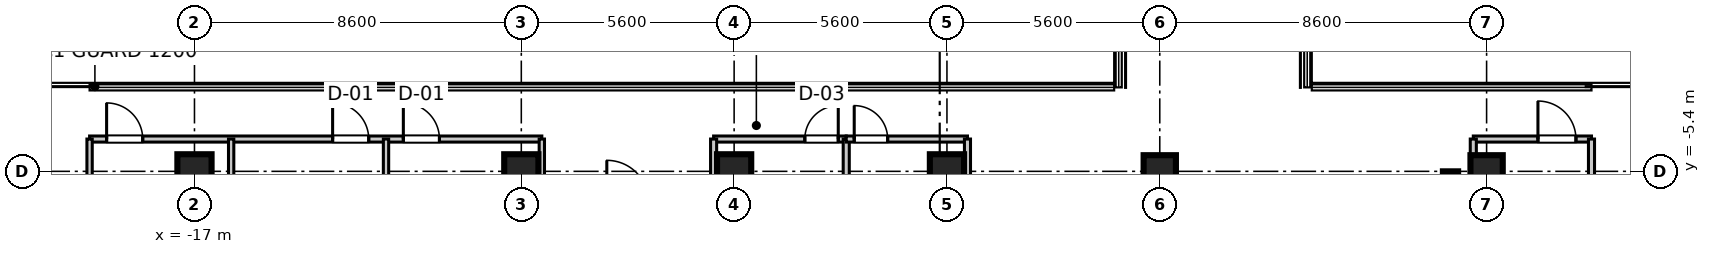
"""IFC4 building model, lengths in metres.
Left out: names, types, materials, properties, quantities, classifications, styles, units other than length and angle.
Written with IfcOpenShell. Run it as: python <this file> out.ifc"""

import sys

from ifc_helpers import new_model, si_unit, direction, frame, frame_2d, origin, origin_2d, place, context, subcontext, project, spatial, rectangle, extrude, source, transform, mapped, element, fill, save


model = new_model("IFC4")
c1 = context("Model", 3, precision=1e-05, world=origin(), true_north=direction((0.0, 1.0)))
c2 = subcontext(c1, "Body", "Model", "MODEL_VIEW")
j1 = project(units=[si_unit("LENGTHUNIT", "METRE"), si_unit("PLANEANGLEUNIT", "RADIAN")], contexts=[c1])
p1 = place(None, origin())
s1 = spatial("IfcSite", under=j1, at=p1, CompositionType="ELEMENT")
p2 = place(p1, origin())
s2 = spatial("IfcBuilding", under=s1, at=p2, CompositionType="ELEMENT")
p3 = place(p2, frame((0.0, 0.0, 311.9)))
s3 = spatial("IfcBuildingStorey", under=s2, at=p3, CompositionType="ELEMENT", Elevation=311.9)
m1 = source(origin(), c2, "Body", "SweptSolid", [
    extrude(rectangle(XDim=0.9, YDim=0.9, at=origin_2d()), origin(), (0.0, 0.0, 1.0), 3.805),
])
for number, where, z_axis, x_axis in (
    (1, (-17.0, -5.4, 0.0), (0.0, 0.0, 1.0), (1.0, 0.0, 0.0)),
    (2, (-8.4, -5.4, 0.0), (0.0, 0.0, 1.0), (1.0, 0.0, 0.0)),
    (3, (-2.8, -5.4, 0.0), (0.0, 0.0, 1.0), (1.0, 0.0, 0.0)),
    (4, (2.8, -5.4, 0.0), (0.0, 0.0, 1.0), (1.0, 0.0, 0.0)),
):
    element("IfcColumn", number, at=place(p3, frame(where, z_axis=z_axis, x_axis=x_axis)), inside=s3, PredefinedType="COLUMN", context=c2, shape_type="MappedRepresentation", body=[
        mapped(m1, transform((0.0, 0.0, 0.0), scale=1.0)),
    ])
m2 = source(origin(), c2, "Body", "SweptSolid", [
    extrude(rectangle(XDim=0.85, YDim=0.85, at=origin_2d()), origin(), (0.0, 0.0, 1.0), 3.805),
])
for number, where, z_axis, x_axis in (
    (5, (8.4, -5.4, 0.0), (0.0, 0.0, 1.0), (1.0, 0.0, 0.0)),
    (6, (17.0, -5.4, 0.0), (0.0, 0.0, 1.0), (1.0, 0.0, 0.0)),
):
    element("IfcColumn", number, at=place(p3, frame(where, z_axis=z_axis, x_axis=x_axis)), inside=s3, PredefinedType="PILASTER", context=c2, shape_type="MappedRepresentation", body=[
        mapped(m2, transform((0.0, 0.0, 0.0), scale=1.0)),
    ])
m3 = source(origin(), c2, "Body", "SweptSolid", [
    extrude(rectangle(XDim=11.6, YDim=0.4, at=frame_2d((5.8, 0.0))), origin(), (0.0, 0.0, 1.0), 3.55),
])
p4 = place(p3, frame((16.05, -17.0, 0.0), z_axis=(0.0, 0.0, 1.0), x_axis=(0.0, 1.0, 0.0)))
e7 = element("IfcWall", 7, at=p4, inside=s3, PredefinedType="SHEAR", context=c2, shape_type="MappedRepresentation", body=[
    mapped(m3, transform((0.0, 0.0, 0.0), scale=1.0)),
])
m4 = source(origin(), c2, "Body", "SweptSolid", [
    extrude(rectangle(XDim=3.11, YDim=0.16, at=frame_2d((1.555, 0.0))), origin(), (0.0, 0.0, 1.0), 2.89),
])
p5 = place(p3, frame((16.65, -4.55, 0.0), z_axis=(0.0, 0.0, 1.0), x_axis=(1.0, 0.0, 0.0)))
e8 = element("IfcWall", 8, at=p5, inside=s3, PredefinedType="PARTITIONING", context=c2, shape_type="MappedRepresentation", body=[
    mapped(m4, transform((0.0, 0.0, 0.0), scale=1.0)),
])
p6 = place(p5, frame((1.701, 0.0, 0.0)))
e9 = element("IfcOpeningElement", 9, at=p6, cuts=e8, PredefinedType="OPENING", context=c2, shape_type="SweptSolid", body=[
    extrude(rectangle(XDim=1.0, YDim=2.1, at=frame_2d((0.5, 1.05))), frame((0.0, 0.09, 0.0), z_axis=(0.0, -1.0, 0.0), x_axis=(1.0, 0.0, 0.0)), (0.0, 0.0, 1.0), 0.18),
])
m5 = source(origin(), c2, "Body", "SweptSolid", [
    extrude(rectangle(XDim=17.95, YDim=0.16, at=frame_2d((8.975, 0.0))), origin(), (0.0, 0.0, 1.0), 2.89),
])
p7 = place(p3, frame((16.65, -22.5, 0.0), z_axis=(0.0, 0.0, 1.0), x_axis=(0.0, 1.0, 0.0)))
e10 = element("IfcWall", 10, at=p7, inside=s3, PredefinedType="PARTITIONING", context=c2, shape_type="MappedRepresentation", body=[
    mapped(m5, transform((0.0, 0.0, 0.0), scale=1.0)),
])
m6 = source(origin(), c2, "Body", "SweptSolid", [
    extrude(rectangle(XDim=16.53, YDim=0.16, at=frame_2d((8.265, 0.0))), origin(), (0.0, 0.0, 1.0), 2.89),
])
p8 = place(p3, frame((19.76, -21.08, 0.0), z_axis=(0.0, 0.0, 1.0), x_axis=(0.0, 1.0, 0.0)))
e11 = element("IfcWall", 11, at=p8, inside=s3, PredefinedType="PARTITIONING", context=c2, shape_type="MappedRepresentation", body=[
    mapped(m6, transform((0.0, 0.0, 0.0), scale=1.0)),
])
m7 = source(origin(), c2, "Body", "SweptSolid", [
    extrude(rectangle(XDim=11.9, YDim=0.16, at=frame_2d((5.95, 0.0))), origin(), (0.0, 0.0, 1.0), 2.89),
])
p9 = place(p3, frame((-19.76, -4.55, 0.0), z_axis=(0.0, 0.0, 1.0), x_axis=(1.0, 0.0, 0.0)))
e12 = element("IfcWall", 12, at=p9, inside=s3, PredefinedType="PARTITIONING", context=c2, shape_type="MappedRepresentation", body=[
    mapped(m7, transform((0.0, 0.0, 0.0), scale=1.0)),
])
p10 = place(p9, frame((0.448, 0.0, 0.0)))
e13 = element("IfcOpeningElement", 13, at=p10, cuts=e12, PredefinedType="OPENING", context=c2, shape_type="SweptSolid", body=[
    extrude(rectangle(XDim=0.95, YDim=2.1, at=frame_2d((0.475, 1.05))), frame((0.0, 0.09, 0.0), z_axis=(0.0, -1.0, 0.0), x_axis=(1.0, 0.0, 0.0)), (0.0, 0.0, 1.0), 0.18),
])
p11 = place(p9, frame((6.395, 0.0, 0.0)))
e14 = element("IfcOpeningElement", 14, at=p11, cuts=e12, PredefinedType="OPENING", context=c2, shape_type="SweptSolid", body=[
    extrude(rectangle(XDim=0.95, YDim=2.1, at=frame_2d((0.475, 1.05))), frame((0.0, 0.09, 0.0), z_axis=(0.0, -1.0, 0.0), x_axis=(1.0, 0.0, 0.0)), (0.0, 0.0, 1.0), 0.18),
])
p12 = place(p9, frame((8.256, 0.0, 0.0)))
e15 = element("IfcOpeningElement", 15, at=p12, cuts=e12, PredefinedType="OPENING", context=c2, shape_type="SweptSolid", body=[
    extrude(rectangle(XDim=0.95, YDim=2.1, at=frame_2d((0.475, 1.05))), frame((0.0, 0.09, 0.0), z_axis=(0.0, -1.0, 0.0), x_axis=(1.0, 0.0, 0.0)), (0.0, 0.0, 1.0), 0.18),
])
m8 = source(origin(), c2, "Body", "SweptSolid", [
    extrude(rectangle(XDim=16.53, YDim=0.14, at=frame_2d((8.265, 0.0))), origin(), (0.0, 0.0, 1.0), 2.89),
])
p13 = place(p3, frame((-19.76, -21.08, 0.0), z_axis=(0.0, 0.0, 1.0), x_axis=(0.0, 1.0, 0.0)))
e16 = element("IfcWall", 16, at=p13, inside=s3, PredefinedType="PARTITIONING", context=c2, shape_type="MappedRepresentation", body=[
    mapped(m8, transform((0.0, 0.0, 0.0), scale=1.0)),
])
m9 = source(origin(), c2, "Body", "SweptSolid", [
    extrude(rectangle(XDim=17.95, YDim=0.14, at=frame_2d((8.975, 0.0))), origin(), (0.0, 0.0, 1.0), 2.89),
])
for number, where, z_axis, x_axis in (
    (17, (-7.86, -22.5, 0.0), (0.0, 0.0, 1.0), (0.0, 1.0, 0.0)),
    (18, (-16.035, -22.5, 0.0), (0.0, 0.0, 1.0), (0.0, 1.0, 0.0)),
    (19, (-11.96, -22.5, 0.0), (0.0, 0.0, 1.0), (0.0, 1.0, 0.0)),
):
    element("IfcWall", number, at=place(p3, frame(where, z_axis=z_axis, x_axis=x_axis)), inside=s3, PredefinedType="PARTITIONING", context=c2, shape_type="MappedRepresentation", body=[
        mapped(m9, transform((0.0, 0.0, 0.0), scale=1.0)),
    ])
m10 = source(origin(), c2, "Body", "SweptSolid", [
    extrude(rectangle(XDim=3.49, YDim=0.16, at=frame_2d((1.745, 0.0))), origin(), (0.0, 0.0, 1.0), 2.89),
])
p14 = place(p3, frame((-3.34, -4.55, 0.0), z_axis=(0.0, 0.0, 1.0), x_axis=(1.0, 0.0, 0.0)))
e20 = element("IfcWall", 20, at=p14, inside=s3, PredefinedType="PARTITIONING", context=c2, shape_type="MappedRepresentation", body=[
    mapped(m10, transform((0.0, 0.0, 0.0), scale=1.0)),
])
p15 = place(p14, frame((2.4, 0.0, 0.0)))
e21 = element("IfcOpeningElement", 21, at=p15, cuts=e20, PredefinedType="OPENING", context=c2, shape_type="SweptSolid", body=[
    extrude(rectangle(XDim=0.88, YDim=2.1, at=frame_2d((0.44, 1.05))), frame((0.0, 0.09, 0.0), z_axis=(0.0, -1.0, 0.0), x_axis=(1.0, 0.0, 0.0)), (0.0, 0.0, 1.0), 0.18),
])
for number, where, z_axis, x_axis in (
    (22, (-3.34, -22.5, 0.0), (0.0, 0.0, 1.0), (0.0, 1.0, 0.0)),
    (23, (0.15, -22.5, 0.0), (0.0, 0.0, 1.0), (0.0, 1.0, 0.0)),
):
    element("IfcWall", number, at=place(p3, frame(where, z_axis=z_axis, x_axis=x_axis)), inside=s3, PredefinedType="PARTITIONING", context=c2, shape_type="MappedRepresentation", body=[
        mapped(m5, transform((0.0, 0.0, 0.0), scale=1.0)),
    ])
m11 = source(origin(), c2, "Body", "SweptSolid", [
    extrude(rectangle(XDim=3.19, YDim=0.16, at=frame_2d((1.595, 0.0))), origin(), (0.0, 0.0, 1.0), 2.89),
])
p16 = place(p3, frame((0.15, -4.55, 0.0), z_axis=(0.0, 0.0, 1.0), x_axis=(1.0, 0.0, 0.0)))
e24 = element("IfcWall", 24, at=p16, inside=s3, PredefinedType="PARTITIONING", context=c2, shape_type="MappedRepresentation", body=[
    mapped(m11, transform((0.0, 0.0, 0.0), scale=1.0)),
])
p17 = place(p16, frame((0.21, 0.0, 0.0)))
e25 = element("IfcOpeningElement", 25, at=p17, cuts=e24, PredefinedType="OPENING", context=c2, shape_type="SweptSolid", body=[
    extrude(rectangle(XDim=0.88, YDim=2.1, at=frame_2d((0.44, 1.05))), frame((0.0, 0.09, 0.0), z_axis=(0.0, -1.0, 0.0), x_axis=(1.0, 0.0, 0.0)), (0.0, 0.0, 1.0), 0.18),
])
p18 = place(p3, frame((3.34, -22.5, 0.0), z_axis=(0.0, 0.0, 1.0), x_axis=(0.0, 1.0, 0.0)))
e26 = element("IfcWall", 26, at=p18, inside=s3, PredefinedType="PARTITIONING", context=c2, shape_type="MappedRepresentation", body=[
    mapped(m5, transform((0.0, 0.0, 0.0), scale=1.0)),
])
m12 = source(origin(), c2, "Body", "SweptSolid", [
    extrude(rectangle(XDim=1.0, YDim=2.1, at=frame_2d((0.5, 1.05))), frame((0.0, 0.025, 0.0), z_axis=(0.0, -1.0, 0.0), x_axis=(1.0, 0.0, 0.0)), (0.0, 0.0, 1.0), 0.05),
])
p19 = place(p6, frame((1.0, 0.0, 0.0), z_axis=(0.0, 0.0, 1.0), x_axis=(-1.0, 0.0, 0.0)))
e27 = element("IfcDoor", 27, at=p19, inside=s3, OperationType="SINGLE_SWING_LEFT", PredefinedType="DOOR", context=c2, shape_type="MappedRepresentation", body=[
    mapped(m12, transform((0.0, 0.0, 0.0), scale=1.0)),
])
fill(e9, e27)
m13 = source(origin(), c2, "Body", "SweptSolid", [
    extrude(rectangle(XDim=0.95, YDim=2.1, at=frame_2d((0.475, 1.05))), frame((0.0, 0.025, 0.0), z_axis=(0.0, -1.0, 0.0), x_axis=(1.0, 0.0, 0.0)), (0.0, 0.0, 1.0), 0.05),
])
p20 = place(p10, frame((0.95, 0.0, 0.0), z_axis=(0.0, 0.0, 1.0), x_axis=(-1.0, 0.0, 0.0)))
e28 = element("IfcDoor", 28, at=p20, inside=s3, OperationType="SINGLE_SWING_LEFT", PredefinedType="DOOR", context=c2, shape_type="MappedRepresentation", body=[
    mapped(m13, transform((0.0, 0.0, 0.0), scale=1.0)),
])
fill(e13, e28)
p21 = place(p11, frame((0.95, 0.0, 0.0), z_axis=(0.0, 0.0, 1.0), x_axis=(-1.0, 0.0, 0.0)))
e29 = element("IfcDoor", 29, at=p21, inside=s3, OperationType="SINGLE_SWING_LEFT", PredefinedType="DOOR", context=c2, shape_type="MappedRepresentation", body=[
    mapped(m13, transform((0.0, 0.0, 0.0), scale=1.0)),
])
fill(e14, e29)
p22 = place(p12, frame((0.95, 0.0, 0.0), z_axis=(0.0, 0.0, 1.0), x_axis=(-1.0, 0.0, 0.0)))
e30 = element("IfcDoor", 30, at=p22, inside=s3, OperationType="SINGLE_SWING_LEFT", PredefinedType="DOOR", context=c2, shape_type="MappedRepresentation", body=[
    mapped(m13, transform((0.0, 0.0, 0.0), scale=1.0)),
])
fill(e15, e30)
m14 = source(origin(), c2, "Body", "SweptSolid", [
    extrude(rectangle(XDim=0.88, YDim=2.1, at=frame_2d((0.44, 1.05))), frame((0.0, 0.025, 0.0), z_axis=(0.0, -1.0, 0.0), x_axis=(1.0, 0.0, 0.0)), (0.0, 0.0, 1.0), 0.05),
])
p23 = place(p15, frame((0.88, 0.0, 0.0), z_axis=(0.0, 0.0, 1.0), x_axis=(-1.0, 0.0, 0.0)))
e31 = element("IfcDoor", 31, at=p23, inside=s3, OperationType="SINGLE_SWING_RIGHT", PredefinedType="DOOR", context=c2, shape_type="MappedRepresentation", body=[
    mapped(m14, transform((0.0, 0.0, 0.0), scale=1.0)),
])
fill(e21, e31)
p24 = place(p17, frame((0.88, 0.0, 0.0), z_axis=(0.0, 0.0, 1.0), x_axis=(-1.0, 0.0, 0.0)))
e32 = element("IfcDoor", 32, at=p24, inside=s3, OperationType="SINGLE_SWING_LEFT", PredefinedType="DOOR", context=c2, shape_type="MappedRepresentation", body=[
    mapped(m14, transform((0.0, 0.0, 0.0), scale=1.0)),
])
fill(e25, e32)
save(model, sys.argv[1])
